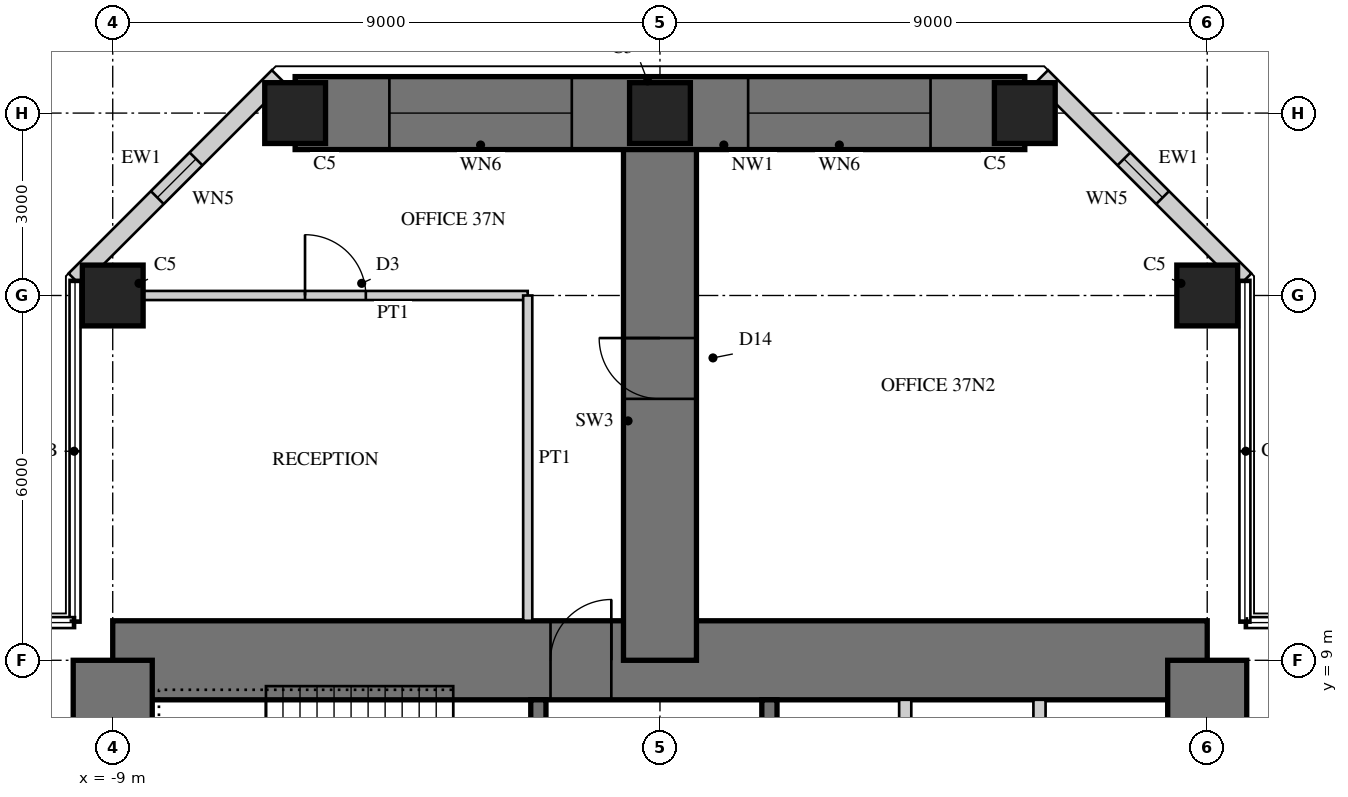
"""IFC4 building model, lengths in metres.
Left out: names, types, materials, properties, quantities, classifications, styles, units other than length and angle.
Written with IfcOpenShell. Run it as: python <this file> out.ifc"""

import sys

from ifc_helpers import new_model, si_unit, direction, frame, frame_2d, origin, origin_2d, place, context, subcontext, project, spatial, rectangle, hollow_rectangle, extrude, element, fill, save


model = new_model("IFC4")
c1 = context("Model", 3, precision=1e-05, world=origin(), true_north=direction((0.0, 1.0)))
c2 = subcontext(c1, "Body", "Model", "MODEL_VIEW")
j1 = project(units=[si_unit("LENGTHUNIT", "METRE"), si_unit("PLANEANGLEUNIT", "RADIAN")], contexts=[c1])
p1 = place(None, origin())
s1 = spatial("IfcSite", under=j1, at=p1, CompositionType="ELEMENT")
p2 = place(p1, origin())
s2 = spatial("IfcBuilding", under=s1, at=p2, CompositionType="ELEMENT")
p3 = place(p2, frame((0.0, 0.0, 152.5)))
s3 = spatial("IfcBuildingStorey", under=s2, at=p3, CompositionType="ELEMENT", Elevation=152.5)
p4 = place(p3, frame((9.0, 9.0, 0.0), z_axis=(0.0, 0.0, 1.0), x_axis=(-1.0, 0.0, 0.0)))
e1 = element("IfcWall", 1, at=p4, inside=s3, PredefinedType="SHEAR", context=c2, shape_type="SweptSolid", body=[
    extrude(rectangle(XDim=18.0, YDim=1.3, at=frame_2d((9.0, 0.0))), origin(), (0.0, 0.0, 1.0), 4.0),
])
p5 = place(p4, frame((9.8, 0.0, 0.0)))
e2 = element("IfcOpeningElement", 2, at=p5, cuts=e1, PredefinedType="OPENING", context=c2, shape_type="SweptSolid", body=[
    extrude(rectangle(XDim=1.0, YDim=2.4, at=frame_2d((0.5, 1.2))), frame((0.0, 0.66, 0.0), z_axis=(0.0, -1.0, 0.0), x_axis=(1.0, 0.0, 0.0)), (0.0, 0.0, 1.0), 1.32),
])
p6 = place(p3, frame((9.0, -9.0, 0.0), z_axis=(0.0, 0.0, 1.0), x_axis=(0.0, 1.0, 0.0)))
e3 = element("IfcWall", 3, at=p6, inside=s3, PredefinedType="SHEAR", context=c2, shape_type="SweptSolid", body=[
    extrude(rectangle(XDim=18.0, YDim=1.3, at=frame_2d((9.0, 0.0))), origin(), (0.0, 0.0, 1.0), 4.0),
])
p7 = place(p6, frame((9.8, 0.0, 0.0)))
e4 = element("IfcOpeningElement", 4, at=p7, cuts=e3, PredefinedType="OPENING", context=c2, shape_type="SweptSolid", body=[
    extrude(rectangle(XDim=1.0, YDim=2.4, at=frame_2d((0.5, 1.2))), frame((0.0, 0.66, 0.0), z_axis=(0.0, -1.0, 0.0), x_axis=(1.0, 0.0, 0.0)), (0.0, 0.0, 1.0), 1.32),
])
p8 = place(p3, frame((-9.0, 9.0, 0.0), z_axis=(0.0, 0.0, 1.0), x_axis=(0.0, -1.0, 0.0)))
e5 = element("IfcWall", 5, at=p8, inside=s3, PredefinedType="SHEAR", context=c2, shape_type="SweptSolid", body=[
    extrude(rectangle(XDim=18.0, YDim=1.3, at=frame_2d((9.0, 0.0))), origin(), (0.0, 0.0, 1.0), 4.0),
])
p9 = place(p8, frame((9.8, 0.0, 0.0)))
e6 = element("IfcOpeningElement", 6, at=p9, cuts=e5, PredefinedType="OPENING", context=c2, shape_type="SweptSolid", body=[
    extrude(rectangle(XDim=1.0, YDim=2.4, at=frame_2d((0.5, 1.2))), frame((0.0, 0.66, 0.0), z_axis=(0.0, -1.0, 0.0), x_axis=(1.0, 0.0, 0.0)), (0.0, 0.0, 1.0), 1.32),
])
p10 = place(p3, frame((1.8, 1.875, 0.0), z_axis=(0.0, 0.0, 1.0), x_axis=(0.0, 1.0, 0.0)))
e7 = element("IfcWall", 7, at=p10, inside=s3, PredefinedType="SHEAR", context=c2, shape_type="SweptSolid", body=[
    extrude(rectangle(XDim=6.475, YDim=0.25, at=frame_2d((3.238, 0.0))), origin(), (0.0, 0.0, 1.0), 4.0),
])
p11 = place(p10, frame((1.875, 0.0, 0.0)))
e8 = element("IfcOpeningElement", 8, at=p11, cuts=e7, PredefinedType="OPENING", context=c2, shape_type="SweptSolid", body=[
    extrude(rectangle(XDim=1.6, YDim=2.4, at=frame_2d((0.8, 1.2))), frame((0.0, 0.135, 0.0), z_axis=(0.0, -1.0, 0.0), x_axis=(1.0, 0.0, 0.0)), (0.0, 0.0, 1.0), 0.27),
])
for number, where, z_axis, x_axis in (
    (9, (4.033, 5.975, 0.0), (0.0, 0.0, 1.0), (0.0, 1.0, 0.0)),
    (10, (6.242, 5.975, 0.0), (0.0, 0.0, 1.0), (0.0, 1.0, 0.0)),
):
    element("IfcWall", number, at=place(p3, frame(where, z_axis=z_axis, x_axis=x_axis)), inside=s3, PredefinedType="PARTITIONING", context=c2, shape_type="SweptSolid", body=[
        extrude(rectangle(XDim=2.375, YDim=0.2, at=frame_2d((1.188, 0.0))), origin(), (0.0, 0.0, 1.0), 4.0),
    ])
p12 = place(p3, frame((-2.0, 1.675, 0.0), z_axis=(0.0, 0.0, 1.0), x_axis=(0.0, 1.0, 0.0)))
e11 = element("IfcWall", 11, at=p12, inside=s3, PredefinedType="SHEAR", context=c2, shape_type="SweptSolid", body=[
    extrude(rectangle(XDim=6.675, YDim=0.25, at=frame_2d((3.337, 0.0))), origin(), (0.0, 0.0, 1.0), 4.0),
])
p13 = place(p12, frame((0.725, 0.0, 0.0)))
e12 = element("IfcOpeningElement", 12, at=p13, cuts=e11, PredefinedType="OPENING", context=c2, shape_type="SweptSolid", body=[
    extrude(rectangle(XDim=1.0, YDim=2.1, at=frame_2d((0.5, 1.05))), frame((0.0, 0.135, 0.0), z_axis=(0.0, -1.0, 0.0), x_axis=(1.0, 0.0, 0.0)), (0.0, 0.0, 1.0), 0.27),
])
p14 = place(p3, frame((0.0, 9.0, 0.0), z_axis=(0.0, 0.0, 1.0), x_axis=(0.0, 1.0, 0.0)))
e13 = element("IfcWall", 13, at=p14, inside=s3, PredefinedType="SHEAR", context=c2, shape_type="SweptSolid", body=[
    extrude(rectangle(XDim=9.0, YDim=1.2, at=frame_2d((4.5, 0.0))), origin(), (0.0, 0.0, 1.0), 4.0),
])
p15 = place(p14, frame((4.3, 0.0, 0.0)))
e14 = element("IfcOpeningElement", 14, at=p15, cuts=e13, PredefinedType="OPENING", context=c2, shape_type="SweptSolid", body=[
    extrude(rectangle(XDim=1.0, YDim=2.2, at=frame_2d((0.5, 1.1))), frame((0.0, 0.61, 0.0), z_axis=(0.0, -1.0, 0.0), x_axis=(1.0, 0.0, 0.0)), (0.0, 0.0, 1.0), 1.22),
])
p16 = place(p3, frame((6.0, 18.0, 0.0), z_axis=(0.0, 0.0, 1.0), x_axis=(-1.0, 0.0, 0.0)))
e15 = element("IfcWall", 15, at=p16, inside=s3, PredefinedType="SHEAR", context=c2, shape_type="SweptSolid", body=[
    extrude(rectangle(XDim=12.0, YDim=1.2, at=frame_2d((6.0, 0.0))), origin(), (0.0, 0.0, 1.0), 4.0),
])
p17 = place(p16, frame((1.55, 0.0, 0.6)))
e16 = element("IfcOpeningElement", 16, at=p17, cuts=e15, PredefinedType="OPENING", context=c2, shape_type="SweptSolid", body=[
    extrude(rectangle(XDim=3.0, YDim=2.4, at=frame_2d((1.5, 1.2))), frame((0.0, 0.61, 0.0), z_axis=(0.0, -1.0, 0.0), x_axis=(1.0, 0.0, 0.0)), (0.0, 0.0, 1.0), 1.22),
])
p18 = place(p16, frame((7.45, 0.0, 0.6)))
e17 = element("IfcOpeningElement", 17, at=p18, cuts=e15, PredefinedType="OPENING", context=c2, shape_type="SweptSolid", body=[
    extrude(rectangle(XDim=3.0, YDim=2.4, at=frame_2d((1.5, 1.2))), frame((0.0, 0.61, 0.0), z_axis=(0.0, -1.0, 0.0), x_axis=(1.0, 0.0, 0.0)), (0.0, 0.0, 1.0), 1.22),
])
for number, where, z_axis, x_axis in (
    (18, (9.0, 15.0, 0.0), (0.0, 0.0, 1.0), (1.0, 0.0, 0.0)),
    (19, (-9.0, 15.0, 0.0), (0.0, 0.0, 1.0), (1.0, 0.0, 0.0)),
    (20, (6.0, 18.0, 0.0), (0.0, 0.0, 1.0), (1.0, 0.0, 0.0)),
    (21, (0.0, 18.0, 0.0), (0.0, 0.0, 1.0), (1.0, 0.0, 0.0)),
    (22, (-6.0, 18.0, 0.0), (0.0, 0.0, 1.0), (1.0, 0.0, 0.0)),
):
    element("IfcColumn", number, at=place(p3, frame(where, z_axis=z_axis, x_axis=x_axis)), inside=s3, PredefinedType="COLUMN", context=c2, shape_type="SweptSolid", body=[
        extrude(rectangle(XDim=1.0, YDim=1.0, at=origin_2d()), origin(), (0.0, 0.0, 1.0), 4.0),
    ])
p19 = place(p3, frame((9.62, 15.257, 0.0), z_axis=(0.0, 0.0, 1.0), x_axis=(-0.707106781187, 0.707106781187, 0.0)))
e23 = element("IfcWall", 23, at=p19, inside=s3, PredefinedType="SOLIDWALL", context=c2, shape_type="SweptSolid", body=[
    extrude(rectangle(XDim=4.728, YDim=0.3, at=frame_2d((2.364, 0.0))), origin(), (0.0, 0.0, 1.0), 3.8),
])
p20 = place(p19, frame((1.914, 0.0, 0.3)))
e24 = element("IfcOpeningElement", 24, at=p20, cuts=e23, PredefinedType="OPENING", context=c2, shape_type="SweptSolid", body=[
    extrude(rectangle(XDim=0.9, YDim=2.4, at=frame_2d((0.45, 1.2))), frame((0.0, 0.16, 0.0), z_axis=(0.0, -1.0, 0.0), x_axis=(1.0, 0.0, 0.0)), (0.0, 0.0, 1.0), 0.32),
])
p21 = place(p3, frame((-6.277, 18.6, 0.0), z_axis=(0.0, 0.0, 1.0), x_axis=(-0.707106781187, -0.707106781187, 0.0)))
e25 = element("IfcWall", 25, at=p21, inside=s3, PredefinedType="SOLIDWALL", context=c2, shape_type="SweptSolid", body=[
    extrude(rectangle(XDim=4.728, YDim=0.3, at=frame_2d((2.364, 0.0))), origin(), (0.0, 0.0, 1.0), 3.8),
])
p22 = place(p21, frame((1.914, 0.0, 0.3)))
e26 = element("IfcOpeningElement", 26, at=p22, cuts=e25, PredefinedType="OPENING", context=c2, shape_type="SweptSolid", body=[
    extrude(rectangle(XDim=0.9, YDim=2.4, at=frame_2d((0.45, 1.2))), frame((0.0, 0.16, 0.0), z_axis=(0.0, -1.0, 0.0), x_axis=(1.0, 0.0, 0.0)), (0.0, 0.0, 1.0), 0.32),
])
p23 = place(p3, frame((-2.175, 15.0, 0.0), z_axis=(0.0, 0.0, 1.0), x_axis=(-1.0, 0.0, 0.0)))
e27 = element("IfcWall", 27, at=p23, inside=s3, PredefinedType="PARTITIONING", context=c2, shape_type="SweptSolid", body=[
    extrude(rectangle(XDim=6.325, YDim=0.15, at=frame_2d((3.163, 0.0))), origin(), (0.0, 0.0, 1.0), 3.0),
])
p24 = place(p23, frame((2.663, 0.0, 0.0)))
e28 = element("IfcOpeningElement", 28, at=p24, cuts=e27, PredefinedType="OPENING", context=c2, shape_type="SweptSolid", body=[
    extrude(rectangle(XDim=1.0, YDim=2.1, at=frame_2d((0.5, 1.05))), frame((0.0, 0.085, 0.0), z_axis=(0.0, -1.0, 0.0), x_axis=(1.0, 0.0, 0.0)), (0.0, 0.0, 1.0), 0.17),
])
p25 = place(p3, frame((-2.175, 9.65, 0.0), z_axis=(0.0, 0.0, 1.0), x_axis=(0.0, 1.0, 0.0)))
e29 = element("IfcWall", 29, at=p25, inside=s3, PredefinedType="PARTITIONING", context=c2, shape_type="SweptSolid", body=[
    extrude(rectangle(XDim=5.35, YDim=0.15, at=frame_2d((2.675, 0.0))), origin(), (0.0, 0.0, 1.0), 3.8),
])
p26 = place(p20, origin())
e30 = element("IfcWindow", 30, at=p26, inside=s3, PartitioningType="SINGLE_PANEL", PredefinedType="WINDOW", context=c2, shape_type="SweptSolid", body=[
    extrude(hollow_rectangle(XDim=0.9, YDim=2.4, WallThickness=0.06, at=frame_2d((0.45, 1.2))), frame((0.0, 0.03, 0.0), z_axis=(0.0, -1.0, 0.0), x_axis=(1.0, 0.0, 0.0)), (0.0, 0.0, 1.0), 0.06),
    extrude(rectangle(XDim=0.779, YDim=2.279, at=frame_2d((0.45, 1.2))), frame((0.0, 0.03, 0.0), z_axis=(0.0, -1.0, 0.0), x_axis=(1.0, 0.0, 0.0)), (0.0, 0.0, 1.0), 0.06),
])
fill(e24, e30)
p27 = place(p17, origin())
e31 = element("IfcWindow", 31, at=p27, inside=s3, PartitioningType="SINGLE_PANEL", PredefinedType="WINDOW", context=c2, shape_type="SweptSolid", body=[
    extrude(hollow_rectangle(XDim=3.0, YDim=2.4, WallThickness=0.06, at=frame_2d((1.5, 1.2))), frame((0.0, 0.03, 0.0), z_axis=(0.0, -1.0, 0.0), x_axis=(1.0, 0.0, 0.0)), (0.0, 0.0, 1.0), 0.06),
    extrude(rectangle(XDim=2.879, YDim=2.279, at=frame_2d((1.5, 1.2))), frame((0.0, 0.03, 0.0), z_axis=(0.0, -1.0, 0.0), x_axis=(1.0, 0.0, 0.0)), (0.0, 0.0, 1.0), 0.06),
])
fill(e16, e31)
p28 = place(p18, origin())
e32 = element("IfcWindow", 32, at=p28, inside=s3, PartitioningType="SINGLE_PANEL", PredefinedType="WINDOW", context=c2, shape_type="SweptSolid", body=[
    extrude(hollow_rectangle(XDim=3.0, YDim=2.4, WallThickness=0.06, at=frame_2d((1.5, 1.2))), frame((0.0, 0.03, 0.0), z_axis=(0.0, -1.0, 0.0), x_axis=(1.0, 0.0, 0.0)), (0.0, 0.0, 1.0), 0.06),
    extrude(rectangle(XDim=2.879, YDim=2.279, at=frame_2d((1.5, 1.2))), frame((0.0, 0.03, 0.0), z_axis=(0.0, -1.0, 0.0), x_axis=(1.0, 0.0, 0.0)), (0.0, 0.0, 1.0), 0.06),
])
fill(e17, e32)
p29 = place(p22, origin())
e33 = element("IfcWindow", 33, at=p29, inside=s3, PartitioningType="SINGLE_PANEL", PredefinedType="WINDOW", context=c2, shape_type="SweptSolid", body=[
    extrude(hollow_rectangle(XDim=0.9, YDim=2.4, WallThickness=0.06, at=frame_2d((0.45, 1.2))), frame((0.0, 0.03, 0.0), z_axis=(0.0, -1.0, 0.0), x_axis=(1.0, 0.0, 0.0)), (0.0, 0.0, 1.0), 0.06),
    extrude(rectangle(XDim=0.779, YDim=2.279, at=frame_2d((0.45, 1.2))), frame((0.0, 0.03, 0.0), z_axis=(0.0, -1.0, 0.0), x_axis=(1.0, 0.0, 0.0)), (0.0, 0.0, 1.0), 0.06),
])
fill(e26, e33)
p30 = place(p24, frame((1.0, 0.0, 0.0), z_axis=(0.0, 0.0, 1.0), x_axis=(-1.0, 0.0, 0.0)))
e34 = element("IfcDoor", 34, at=p30, inside=s3, OperationType="SINGLE_SWING_LEFT", PredefinedType="DOOR", context=c2, shape_type="SweptSolid", body=[
    extrude(rectangle(XDim=1.0, YDim=2.1, at=frame_2d((0.5, 1.05))), frame((0.0, 0.025, 0.0), z_axis=(0.0, -1.0, 0.0), x_axis=(1.0, 0.0, 0.0)), (0.0, 0.0, 1.0), 0.05),
])
fill(e28, e34)
p31 = place(p15, origin())
e35 = element("IfcDoor", 35, at=p31, inside=s3, OperationType="SINGLE_SWING_RIGHT", PredefinedType="DOOR", context=c2, shape_type="SweptSolid", body=[
    extrude(rectangle(XDim=1.0, YDim=2.2, at=frame_2d((0.5, 1.1))), frame((0.0, 0.025, 0.0), z_axis=(0.0, -1.0, 0.0), x_axis=(1.0, 0.0, 0.0)), (0.0, 0.0, 1.0), 0.05),
])
fill(e14, e35)
p32 = place(p5, frame((1.0, 0.0, 0.0), z_axis=(0.0, 0.0, 1.0), x_axis=(-1.0, 0.0, 0.0)))
e36 = element("IfcDoor", 36, at=p32, inside=s3, OperationType="SINGLE_SWING_RIGHT", PredefinedType="DOOR", context=c2, shape_type="SweptSolid", body=[
    extrude(rectangle(XDim=1.0, YDim=2.4, at=frame_2d((0.5, 1.2))), frame((0.0, -0.005, 0.0), z_axis=(0.0, -1.0, 0.0), x_axis=(1.0, 0.0, 0.0)), (0.0, 0.0, 1.0), 0.05),
])
fill(e2, e36)
save(model, sys.argv[1])
